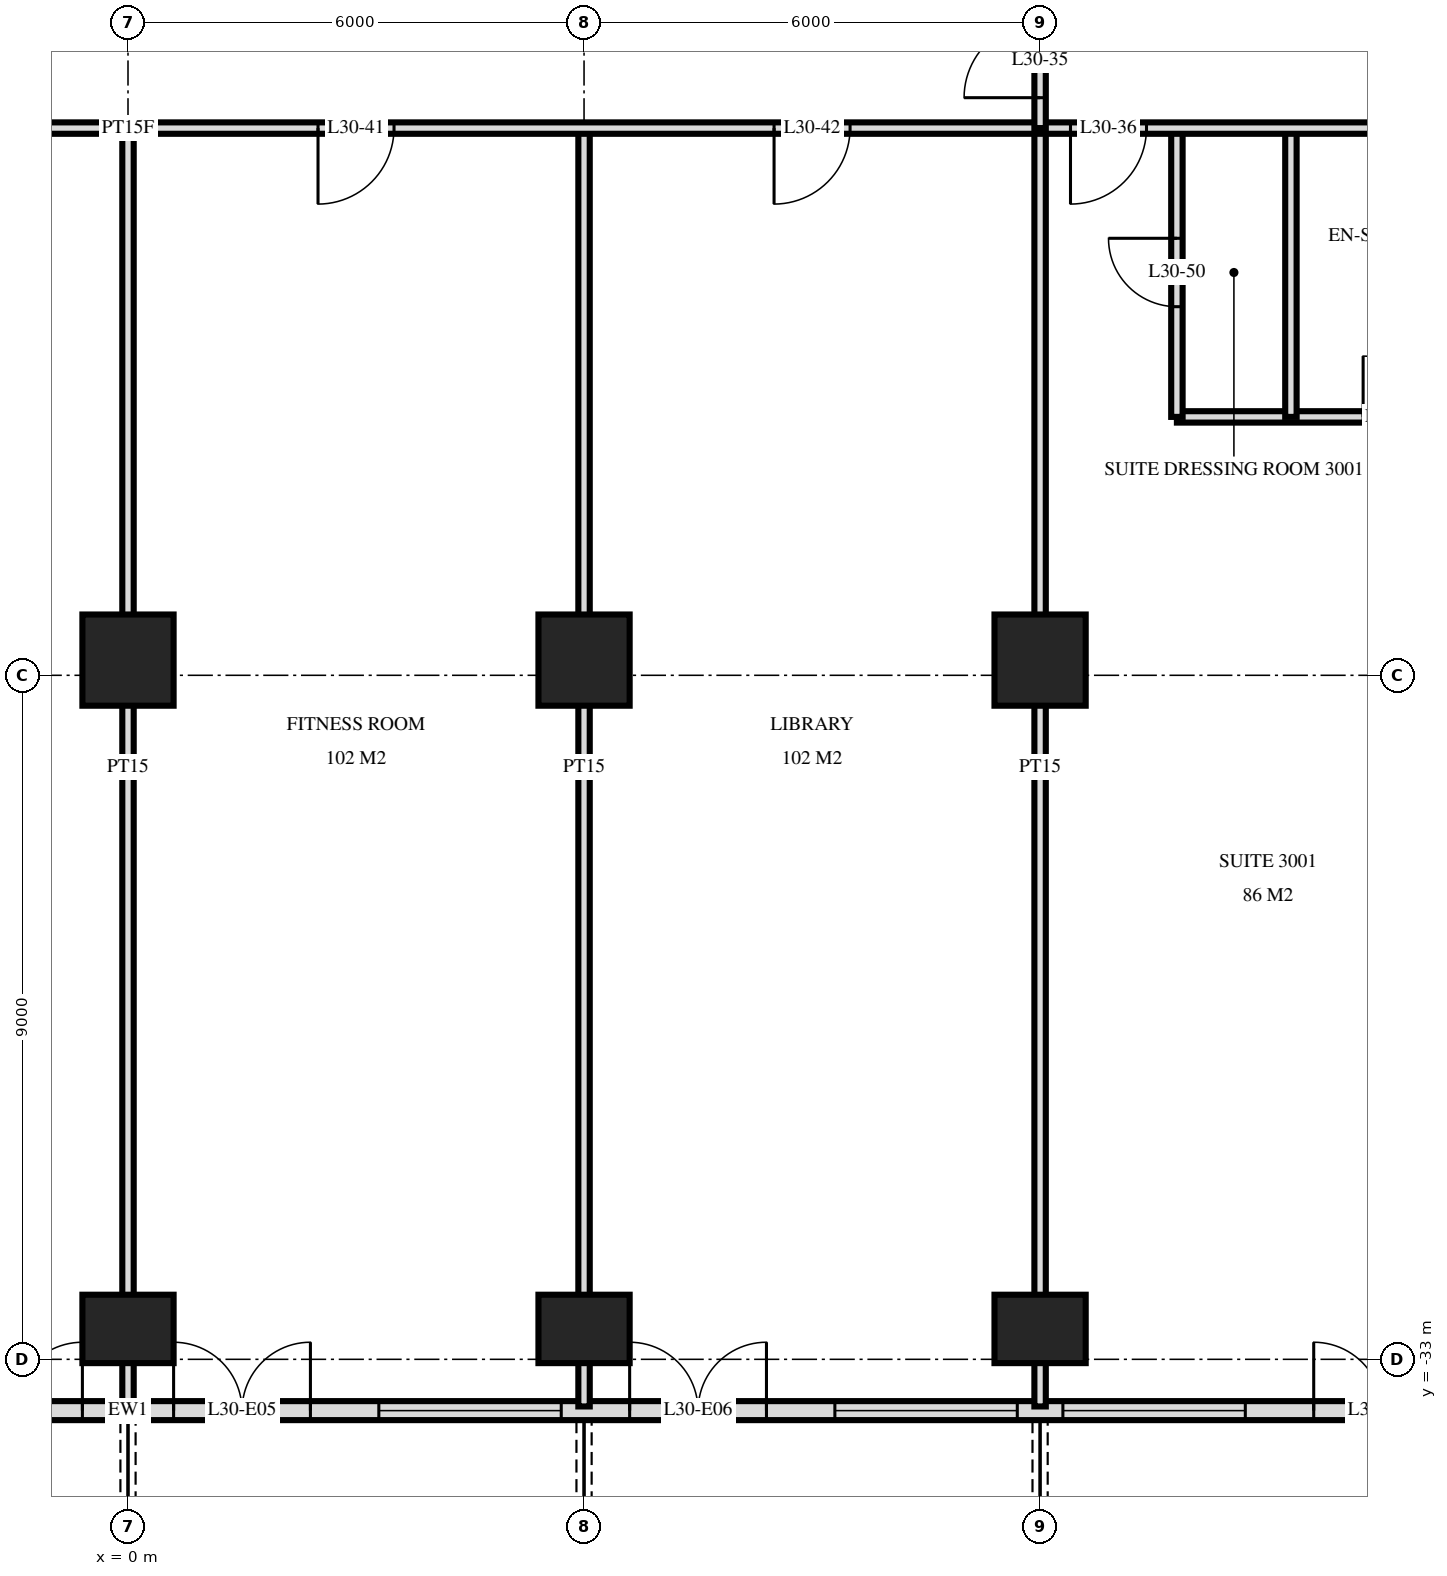
"""IFC4 building model, lengths in metres.
Left out: names, types, materials, properties, quantities, classifications, styles, units other than length and angle.
Written with IfcOpenShell. Run it as: python <this file> out.ifc"""

import sys

from ifc_helpers import new_model, si_unit, direction, frame, frame_2d, origin, origin_2d, place, context, subcontext, project, spatial, rectangle, extrude, element, fill, save


model = new_model("IFC4")
c1 = context("Model", 3, precision=1e-05, world=origin(), true_north=direction((0.0, 1.0)))
c2 = subcontext(c1, "Body", "Model", "MODEL_VIEW")
j1 = project(units=[si_unit("LENGTHUNIT", "METRE"), si_unit("PLANEANGLEUNIT", "RADIAN")], contexts=[c1])
p1 = place(None, origin())
s1 = spatial("IfcSite", under=j1, at=p1, CompositionType="ELEMENT")
p2 = place(p1, origin())
s2 = spatial("IfcBuilding", under=s1, at=p2, CompositionType="ELEMENT")
p3 = place(p2, frame((0.0, 0.0, 120.0)))
s3 = spatial("IfcBuildingStorey", under=s2, at=p3, CompositionType="ELEMENT", Elevation=120.0)
p4 = place(p3, frame((0.0, -32.6, 0.0), z_axis=(0.0, 0.0, 1.0), x_axis=(1.0, 0.0, 0.0)))
e1 = element("IfcColumn", 1, at=p4, inside=s3, PredefinedType="COLUMN", context=c2, shape_type="SweptSolid", body=[
    extrude(rectangle(XDim=1.2, YDim=0.9, at=origin_2d()), origin(), (0.0, 0.0, 1.0), 3.6),
])
p5 = place(p3, frame((0.0, -23.8, 0.0), z_axis=(0.0, 0.0, 1.0), x_axis=(1.0, 0.0, 0.0)))
e2 = element("IfcColumn", 2, at=p5, inside=s3, PredefinedType="COLUMN", context=c2, shape_type="SweptSolid", body=[
    extrude(rectangle(XDim=1.2, YDim=1.2, at=origin_2d()), origin(), (0.0, 0.0, 1.0), 3.6),
])
p6 = place(p3, frame((6.0, -32.6, 0.0), z_axis=(0.0, 0.0, 1.0), x_axis=(1.0, 0.0, 0.0)))
e3 = element("IfcColumn", 3, at=p6, inside=s3, PredefinedType="COLUMN", context=c2, shape_type="SweptSolid", body=[
    extrude(rectangle(XDim=1.2, YDim=0.9, at=origin_2d()), origin(), (0.0, 0.0, 1.0), 3.6),
])
p7 = place(p3, frame((6.0, -23.8, 0.0), z_axis=(0.0, 0.0, 1.0), x_axis=(1.0, 0.0, 0.0)))
e4 = element("IfcColumn", 4, at=p7, inside=s3, PredefinedType="COLUMN", context=c2, shape_type="SweptSolid", body=[
    extrude(rectangle(XDim=1.2, YDim=1.2, at=origin_2d()), origin(), (0.0, 0.0, 1.0), 3.6),
])
p8 = place(p3, frame((12.0, -32.6, 0.0), z_axis=(0.0, 0.0, 1.0), x_axis=(1.0, 0.0, 0.0)))
e5 = element("IfcColumn", 5, at=p8, inside=s3, PredefinedType="COLUMN", context=c2, shape_type="SweptSolid", body=[
    extrude(rectangle(XDim=1.2, YDim=0.9, at=origin_2d()), origin(), (0.0, 0.0, 1.0), 3.6),
])
p9 = place(p3, frame((12.0, -23.8, 0.0), z_axis=(0.0, 0.0, 1.0), x_axis=(1.0, 0.0, 0.0)))
e6 = element("IfcColumn", 6, at=p9, inside=s3, PredefinedType="COLUMN", context=c2, shape_type="SweptSolid", body=[
    extrude(rectangle(XDim=1.2, YDim=1.2, at=origin_2d()), origin(), (0.0, 0.0, 1.0), 3.6),
])
p10 = place(p3, frame((-23.675, -33.675, 0.0), z_axis=(0.0, 0.0, 1.0), x_axis=(1.0, 0.0, 0.0)))
e7 = element("IfcWall", 7, at=p10, inside=s3, PredefinedType="SOLIDWALL", context=c2, shape_type="SweptSolid", body=[
    extrude(rectangle(XDim=47.351, YDim=0.25, at=frame_2d((23.675, 0.0))), origin(), (0.0, 0.0, 1.0), 3.32),
])
p11 = place(p10, frame((0.275, 0.0, 0.3)))
e8 = element("IfcOpeningElement", 8, at=p11, cuts=e7, PredefinedType="OPENING", context=c2, shape_type="SweptSolid", body=[
    extrude(rectangle(XDim=2.4, YDim=2.1, at=frame_2d((1.2, 1.05))), frame((0.0, 0.135, 0.0), z_axis=(0.0, -1.0, 0.0), x_axis=(1.0, 0.0, 0.0)), (0.0, 0.0, 1.0), 0.27),
])
p12 = place(p10, frame((3.425, 0.0, 0.0)))
e9 = element("IfcOpeningElement", 9, at=p12, cuts=e7, PredefinedType="OPENING", context=c2, shape_type="SweptSolid", body=[
    extrude(rectangle(XDim=1.8, YDim=2.4, at=frame_2d((0.9, 1.2))), frame((0.0, 0.135, 0.0), z_axis=(0.0, -1.0, 0.0), x_axis=(1.0, 0.0, 0.0)), (0.0, 0.0, 1.0), 0.27),
])
p13 = place(p10, frame((7.775, 0.0, 0.0)))
e10 = element("IfcOpeningElement", 10, at=p13, cuts=e7, PredefinedType="OPENING", context=c2, shape_type="SweptSolid", body=[
    extrude(rectangle(XDim=1.8, YDim=2.4, at=frame_2d((0.9, 1.2))), frame((0.0, 0.135, 0.0), z_axis=(0.0, -1.0, 0.0), x_axis=(1.0, 0.0, 0.0)), (0.0, 0.0, 1.0), 0.27),
])
p14 = place(p10, frame((12.275, 0.0, 0.0)))
e11 = element("IfcOpeningElement", 11, at=p14, cuts=e7, PredefinedType="OPENING", context=c2, shape_type="SweptSolid", body=[
    extrude(rectangle(XDim=1.8, YDim=2.4, at=frame_2d((0.9, 1.2))), frame((0.0, 0.135, 0.0), z_axis=(0.0, -1.0, 0.0), x_axis=(1.0, 0.0, 0.0)), (0.0, 0.0, 1.0), 0.27),
])
p15 = place(p10, frame((14.975, 0.0, 0.3)))
e12 = element("IfcOpeningElement", 12, at=p15, cuts=e7, PredefinedType="OPENING", context=c2, shape_type="SweptSolid", body=[
    extrude(rectangle(XDim=2.4, YDim=2.1, at=frame_2d((1.2, 1.05))), frame((0.0, 0.135, 0.0), z_axis=(0.0, -1.0, 0.0), x_axis=(1.0, 0.0, 0.0)), (0.0, 0.0, 1.0), 0.27),
])
p16 = place(p10, frame((17.975, 0.0, 0.3)))
e13 = element("IfcOpeningElement", 13, at=p16, cuts=e7, PredefinedType="OPENING", context=c2, shape_type="SweptSolid", body=[
    extrude(rectangle(XDim=2.4, YDim=2.1, at=frame_2d((1.2, 1.05))), frame((0.0, 0.135, 0.0), z_axis=(0.0, -1.0, 0.0), x_axis=(1.0, 0.0, 0.0)), (0.0, 0.0, 1.0), 0.27),
])
p17 = place(p10, frame((21.275, 0.0, 0.0)))
e14 = element("IfcOpeningElement", 14, at=p17, cuts=e7, PredefinedType="OPENING", context=c2, shape_type="SweptSolid", body=[
    extrude(rectangle(XDim=1.8, YDim=2.4, at=frame_2d((0.9, 1.2))), frame((0.0, 0.135, 0.0), z_axis=(0.0, -1.0, 0.0), x_axis=(1.0, 0.0, 0.0)), (0.0, 0.0, 1.0), 0.27),
])
p18 = place(p10, frame((24.275, 0.0, 0.0)))
e15 = element("IfcOpeningElement", 15, at=p18, cuts=e7, PredefinedType="OPENING", context=c2, shape_type="SweptSolid", body=[
    extrude(rectangle(XDim=1.8, YDim=2.4, at=frame_2d((0.9, 1.2))), frame((0.0, 0.135, 0.0), z_axis=(0.0, -1.0, 0.0), x_axis=(1.0, 0.0, 0.0)), (0.0, 0.0, 1.0), 0.27),
])
p19 = place(p10, frame((26.975, 0.0, 0.3)))
e16 = element("IfcOpeningElement", 16, at=p19, cuts=e7, PredefinedType="OPENING", context=c2, shape_type="SweptSolid", body=[
    extrude(rectangle(XDim=2.4, YDim=2.1, at=frame_2d((1.2, 1.05))), frame((0.0, 0.135, 0.0), z_axis=(0.0, -1.0, 0.0), x_axis=(1.0, 0.0, 0.0)), (0.0, 0.0, 1.0), 0.27),
])
p20 = place(p10, frame((30.275, 0.0, 0.0)))
e17 = element("IfcOpeningElement", 17, at=p20, cuts=e7, PredefinedType="OPENING", context=c2, shape_type="SweptSolid", body=[
    extrude(rectangle(XDim=1.8, YDim=2.4, at=frame_2d((0.9, 1.2))), frame((0.0, 0.135, 0.0), z_axis=(0.0, -1.0, 0.0), x_axis=(1.0, 0.0, 0.0)), (0.0, 0.0, 1.0), 0.27),
])
p21 = place(p10, frame((32.975, 0.0, 0.3)))
e18 = element("IfcOpeningElement", 18, at=p21, cuts=e7, PredefinedType="OPENING", context=c2, shape_type="SweptSolid", body=[
    extrude(rectangle(XDim=2.4, YDim=2.1, at=frame_2d((1.2, 1.05))), frame((0.0, 0.135, 0.0), z_axis=(0.0, -1.0, 0.0), x_axis=(1.0, 0.0, 0.0)), (0.0, 0.0, 1.0), 0.27),
])
p22 = place(p10, frame((35.975, 0.0, 0.3)))
e19 = element("IfcOpeningElement", 19, at=p22, cuts=e7, PredefinedType="OPENING", context=c2, shape_type="SweptSolid", body=[
    extrude(rectangle(XDim=2.4, YDim=2.1, at=frame_2d((1.2, 1.05))), frame((0.0, 0.135, 0.0), z_axis=(0.0, -1.0, 0.0), x_axis=(1.0, 0.0, 0.0)), (0.0, 0.0, 1.0), 0.27),
])
p23 = place(p10, frame((39.275, 0.0, 0.0)))
e20 = element("IfcOpeningElement", 20, at=p23, cuts=e7, PredefinedType="OPENING", context=c2, shape_type="SweptSolid", body=[
    extrude(rectangle(XDim=1.8, YDim=2.4, at=frame_2d((0.9, 1.2))), frame((0.0, 0.135, 0.0), z_axis=(0.0, -1.0, 0.0), x_axis=(1.0, 0.0, 0.0)), (0.0, 0.0, 1.0), 0.27),
])
p24 = place(p10, frame((41.975, 0.0, 0.3)))
e21 = element("IfcOpeningElement", 21, at=p24, cuts=e7, PredefinedType="OPENING", context=c2, shape_type="SweptSolid", body=[
    extrude(rectangle(XDim=2.4, YDim=2.1, at=frame_2d((1.2, 1.05))), frame((0.0, 0.135, 0.0), z_axis=(0.0, -1.0, 0.0), x_axis=(1.0, 0.0, 0.0)), (0.0, 0.0, 1.0), 0.27),
])
p25 = place(p10, frame((45.125, 0.0, 0.0)))
e22 = element("IfcOpeningElement", 22, at=p25, cuts=e7, PredefinedType="OPENING", context=c2, shape_type="SweptSolid", body=[
    extrude(rectangle(XDim=1.8, YDim=2.4, at=frame_2d((0.9, 1.2))), frame((0.0, 0.135, 0.0), z_axis=(0.0, -1.0, 0.0), x_axis=(1.0, 0.0, 0.0)), (0.0, 0.0, 1.0), 0.27),
])
p26 = place(p3, frame((15.3, -20.6, 0.0), z_axis=(0.0, 0.0, 1.0), x_axis=(0.0, 1.0, 0.0)))
e23 = element("IfcWall", 23, at=p26, inside=s3, PredefinedType="PARTITIONING", context=c2, shape_type="SweptSolid", body=[
    extrude(rectangle(XDim=3.8, YDim=0.15, at=frame_2d((1.9, 0.0))), origin(), (0.0, 0.0, 1.0), 3.32),
])
p27 = place(p3, frame((13.8, -20.6, 0.0), z_axis=(0.0, 0.0, 1.0), x_axis=(0.0, 1.0, 0.0)))
e24 = element("IfcWall", 24, at=p27, inside=s3, PredefinedType="PARTITIONING", context=c2, shape_type="SweptSolid", body=[
    extrude(rectangle(XDim=3.8, YDim=0.15, at=frame_2d((1.9, 0.0))), origin(), (0.0, 0.0, 1.0), 3.32),
])
p28 = place(p27, frame((1.45, 0.0, 0.0)))
e25 = element("IfcOpeningElement", 25, at=p28, cuts=e24, PredefinedType="OPENING", context=c2, shape_type="SweptSolid", body=[
    extrude(rectangle(XDim=0.9, YDim=2.1, at=frame_2d((0.45, 1.05))), frame((0.0, 0.085, 0.0), z_axis=(0.0, -1.0, 0.0), x_axis=(1.0, 0.0, 0.0)), (0.0, 0.0, 1.0), 0.17),
])
p29 = place(p3, frame((12.0, -16.8, 0.0), z_axis=(0.0, 0.0, 1.0), x_axis=(0.0, 1.0, 0.0)))
e26 = element("IfcWall", 26, at=p29, inside=s3, PredefinedType="PARTITIONING", context=c2, shape_type="SweptSolid", body=[
    extrude(rectangle(XDim=1.75, YDim=0.15, at=frame_2d((0.875, 0.0))), origin(), (0.0, 0.0, 1.0), 3.32),
])
p30 = place(p29, frame((0.4, 0.0, 0.0)))
e27 = element("IfcOpeningElement", 27, at=p30, cuts=e26, PredefinedType="OPENING", context=c2, shape_type="SweptSolid", body=[
    extrude(rectangle(XDim=1.0, YDim=2.1, at=frame_2d((0.5, 1.05))), frame((0.0, 0.085, 0.0), z_axis=(0.0, -1.0, 0.0), x_axis=(1.0, 0.0, 0.0)), (0.0, 0.0, 1.0), 0.17),
])
for number, where, z_axis, x_axis in (
    (28, (12.0, -33.62, 0.0), (0.0, 0.0, 1.0), (0.0, 1.0, 0.0)),
    (29, (6.0, -33.62, 0.0), (0.0, 0.0, 1.0), (0.0, 1.0, 0.0)),
    (30, (0.0, -33.62, 0.0), (0.0, 0.0, 1.0), (0.0, 1.0, 0.0)),
):
    element("IfcWall", number, at=place(p3, frame(where, z_axis=z_axis, x_axis=x_axis)), inside=s3, PredefinedType="PARTITIONING", context=c2, shape_type="SweptSolid", body=[
        extrude(rectangle(XDim=16.82, YDim=0.15, at=frame_2d((8.41, 0.0))), origin(), (0.0, 0.0, 1.0), 3.32),
    ])
p31 = place(p3, frame((13.8, -20.6, 0.0), z_axis=(0.0, 0.0, 1.0), x_axis=(1.0, 0.0, 0.0)))
e31 = element("IfcWall", 31, at=p31, inside=s3, PredefinedType="PARTITIONING", context=c2, shape_type="SweptSolid", body=[
    extrude(rectangle(XDim=4.2, YDim=0.15, at=frame_2d((2.1, 0.0))), origin(), (0.0, 0.0, 1.0), 3.32),
])
p32 = place(p31, frame((2.45, 0.0, 0.0)))
e32 = element("IfcOpeningElement", 32, at=p32, cuts=e31, PredefinedType="OPENING", context=c2, shape_type="SweptSolid", body=[
    extrude(rectangle(XDim=0.8, YDim=2.1, at=frame_2d((0.4, 1.05))), frame((0.0, 0.085, 0.0), z_axis=(0.0, -1.0, 0.0), x_axis=(1.0, 0.0, 0.0)), (0.0, 0.0, 1.0), 0.17),
])
p33 = place(p3, frame((-28.02, -16.8, 0.0), z_axis=(0.0, 0.0, 1.0), x_axis=(1.0, 0.0, 0.0)))
e33 = element("IfcWall", 33, at=p33, inside=s3, PredefinedType="PARTITIONING", context=c2, shape_type="SweptSolid", body=[
    extrude(rectangle(XDim=56.04, YDim=0.15, at=frame_2d((28.02, 0.0))), origin(), (0.0, 0.0, 1.0), 3.32),
])
p34 = place(p33, frame((12.52, 0.0, 0.0)))
e34 = element("IfcOpeningElement", 34, at=p34, cuts=e33, PredefinedType="OPENING", context=c2, shape_type="SweptSolid", body=[
    extrude(rectangle(XDim=1.0, YDim=2.1, at=frame_2d((0.5, 1.05))), frame((0.0, 0.085, 0.0), z_axis=(0.0, -1.0, 0.0), x_axis=(1.0, 0.0, 0.0)), (0.0, 0.0, 1.0), 0.17),
])
p35 = place(p33, frame((8.32, 0.0, 0.0)))
e35 = element("IfcOpeningElement", 35, at=p35, cuts=e33, PredefinedType="OPENING", context=c2, shape_type="SweptSolid", body=[
    extrude(rectangle(XDim=1.0, YDim=2.1, at=frame_2d((0.5, 1.05))), frame((0.0, 0.085, 0.0), z_axis=(0.0, -1.0, 0.0), x_axis=(1.0, 0.0, 0.0)), (0.0, 0.0, 1.0), 0.17),
])
p36 = place(p33, frame((40.42, 0.0, 0.0)))
e36 = element("IfcOpeningElement", 36, at=p36, cuts=e33, PredefinedType="OPENING", context=c2, shape_type="SweptSolid", body=[
    extrude(rectangle(XDim=1.0, YDim=2.1, at=frame_2d((0.5, 1.05))), frame((0.0, 0.085, 0.0), z_axis=(0.0, -1.0, 0.0), x_axis=(1.0, 0.0, 0.0)), (0.0, 0.0, 1.0), 0.17),
])
p37 = place(p33, frame((46.72, 0.0, 0.0)))
e37 = element("IfcOpeningElement", 37, at=p37, cuts=e33, PredefinedType="OPENING", context=c2, shape_type="SweptSolid", body=[
    extrude(rectangle(XDim=1.0, YDim=2.1, at=frame_2d((0.5, 1.05))), frame((0.0, 0.085, 0.0), z_axis=(0.0, -1.0, 0.0), x_axis=(1.0, 0.0, 0.0)), (0.0, 0.0, 1.0), 0.17),
])
p38 = place(p33, frame((21.52, 0.0, 0.0)))
e38 = element("IfcOpeningElement", 38, at=p38, cuts=e33, PredefinedType="OPENING", context=c2, shape_type="SweptSolid", body=[
    extrude(rectangle(XDim=1.0, YDim=2.1, at=frame_2d((0.5, 1.05))), frame((0.0, 0.085, 0.0), z_axis=(0.0, -1.0, 0.0), x_axis=(1.0, 0.0, 0.0)), (0.0, 0.0, 1.0), 0.17),
])
p39 = place(p33, frame((30.52, 0.0, 0.0)))
e39 = element("IfcOpeningElement", 39, at=p39, cuts=e33, PredefinedType="OPENING", context=c2, shape_type="SweptSolid", body=[
    extrude(rectangle(XDim=1.0, YDim=2.1, at=frame_2d((0.5, 1.05))), frame((0.0, 0.085, 0.0), z_axis=(0.0, -1.0, 0.0), x_axis=(1.0, 0.0, 0.0)), (0.0, 0.0, 1.0), 0.17),
])
p40 = place(p33, frame((36.52, 0.0, 0.0)))
e40 = element("IfcOpeningElement", 40, at=p40, cuts=e33, PredefinedType="OPENING", context=c2, shape_type="SweptSolid", body=[
    extrude(rectangle(XDim=1.0, YDim=2.1, at=frame_2d((0.5, 1.05))), frame((0.0, 0.085, 0.0), z_axis=(0.0, -1.0, 0.0), x_axis=(1.0, 0.0, 0.0)), (0.0, 0.0, 1.0), 0.17),
])
p41 = place(p17, origin())
e41 = element("IfcDoor", 41, at=p41, inside=s3, OperationType="DOUBLE_DOOR_SINGLE_SWING", PredefinedType="DOOR", context=c2, shape_type="SweptSolid", body=[
    extrude(rectangle(XDim=1.8, YDim=2.4, at=frame_2d((0.9, 1.2))), frame((0.0, 0.025, 0.0), z_axis=(0.0, -1.0, 0.0), x_axis=(1.0, 0.0, 0.0)), (0.0, 0.0, 1.0), 0.05),
])
fill(e14, e41)
p42 = place(p18, origin())
e42 = element("IfcDoor", 42, at=p42, inside=s3, OperationType="DOUBLE_DOOR_SINGLE_SWING", PredefinedType="DOOR", context=c2, shape_type="SweptSolid", body=[
    extrude(rectangle(XDim=1.8, YDim=2.4, at=frame_2d((0.9, 1.2))), frame((0.0, 0.025, 0.0), z_axis=(0.0, -1.0, 0.0), x_axis=(1.0, 0.0, 0.0)), (0.0, 0.0, 1.0), 0.05),
])
fill(e15, e42)
p43 = place(p19, origin())
e43 = element("IfcWindow", 43, at=p43, inside=s3, PartitioningType="SINGLE_PANEL", PredefinedType="WINDOW", context=c2, shape_type="SweptSolid", body=[
    extrude(rectangle(XDim=2.4, YDim=2.1, at=frame_2d((1.2, 1.05))), frame((0.0, 0.03, 0.0), z_axis=(0.0, -1.0, 0.0), x_axis=(1.0, 0.0, 0.0)), (0.0, 0.0, 1.0), 0.06),
])
fill(e16, e43)
p44 = place(p20, origin())
e44 = element("IfcDoor", 44, at=p44, inside=s3, OperationType="DOUBLE_DOOR_SINGLE_SWING", PredefinedType="DOOR", context=c2, shape_type="SweptSolid", body=[
    extrude(rectangle(XDim=1.8, YDim=2.4, at=frame_2d((0.9, 1.2))), frame((0.0, 0.025, 0.0), z_axis=(0.0, -1.0, 0.0), x_axis=(1.0, 0.0, 0.0)), (0.0, 0.0, 1.0), 0.05),
])
fill(e17, e44)
p45 = place(p21, origin())
e45 = element("IfcWindow", 45, at=p45, inside=s3, PartitioningType="SINGLE_PANEL", PredefinedType="WINDOW", context=c2, shape_type="SweptSolid", body=[
    extrude(rectangle(XDim=2.4, YDim=2.1, at=frame_2d((1.2, 1.05))), frame((0.0, 0.03, 0.0), z_axis=(0.0, -1.0, 0.0), x_axis=(1.0, 0.0, 0.0)), (0.0, 0.0, 1.0), 0.06),
])
fill(e18, e45)
p46 = place(p22, origin())
e46 = element("IfcWindow", 46, at=p46, inside=s3, PartitioningType="SINGLE_PANEL", PredefinedType="WINDOW", context=c2, shape_type="SweptSolid", body=[
    extrude(rectangle(XDim=2.4, YDim=2.1, at=frame_2d((1.2, 1.05))), frame((0.0, 0.03, 0.0), z_axis=(0.0, -1.0, 0.0), x_axis=(1.0, 0.0, 0.0)), (0.0, 0.0, 1.0), 0.06),
])
fill(e19, e46)
p47 = place(p23, origin())
e47 = element("IfcDoor", 47, at=p47, inside=s3, OperationType="DOUBLE_DOOR_SINGLE_SWING", PredefinedType="DOOR", context=c2, shape_type="SweptSolid", body=[
    extrude(rectangle(XDim=1.8, YDim=2.4, at=frame_2d((0.9, 1.2))), frame((0.0, 0.025, 0.0), z_axis=(0.0, -1.0, 0.0), x_axis=(1.0, 0.0, 0.0)), (0.0, 0.0, 1.0), 0.05),
])
fill(e20, e47)
p48 = place(p30, origin())
e48 = element("IfcDoor", 48, at=p48, inside=s3, OperationType="SINGLE_SWING_RIGHT", PredefinedType="DOOR", context=c2, shape_type="SweptSolid", body=[
    extrude(rectangle(XDim=1.0, YDim=2.1, at=frame_2d((0.5, 1.05))), frame((0.0, 0.025, 0.0), z_axis=(0.0, -1.0, 0.0), x_axis=(1.0, 0.0, 0.0)), (0.0, 0.0, 1.0), 0.05),
])
fill(e27, e48)
p49 = place(p36, frame((0.5, 0.0, 0.0), z_axis=(0.0, 0.0, 1.0), x_axis=(-1.0, 0.0, 0.0)))
e49 = element("IfcDoor", 49, at=p49, inside=s3, OperationType="SINGLE_SWING_LEFT", PredefinedType="DOOR", context=c2, shape_type="SweptSolid", body=[
    extrude(rectangle(XDim=1.0, YDim=2.1, at=frame_2d((0.0, 1.05))), frame((0.0, -0.025, 0.0), z_axis=(0.0, 1.0, 0.0), x_axis=(-1.0, 0.0, 0.0)), (0.0, 0.0, 1.0), 0.05),
])
fill(e36, e49)
p50 = place(p39, frame((0.5, 0.0, 0.0), z_axis=(0.0, 0.0, 1.0), x_axis=(-1.0, 0.0, 0.0)))
e50 = element("IfcDoor", 50, at=p50, inside=s3, OperationType="SINGLE_SWING_LEFT", PredefinedType="DOOR", context=c2, shape_type="SweptSolid", body=[
    extrude(rectangle(XDim=1.0, YDim=2.1, at=frame_2d((0.0, 1.05))), frame((0.0, -0.025, 0.0), z_axis=(0.0, 1.0, 0.0), x_axis=(-1.0, 0.0, 0.0)), (0.0, 0.0, 1.0), 0.05),
])
fill(e39, e50)
p51 = place(p40, frame((0.5, 0.0, 0.0), z_axis=(0.0, 0.0, 1.0), x_axis=(-1.0, 0.0, 0.0)))
e51 = element("IfcDoor", 51, at=p51, inside=s3, OperationType="SINGLE_SWING_LEFT", PredefinedType="DOOR", context=c2, shape_type="SweptSolid", body=[
    extrude(rectangle(XDim=1.0, YDim=2.1, at=frame_2d((0.0, 1.05))), frame((0.0, -0.025, 0.0), z_axis=(0.0, 1.0, 0.0), x_axis=(-1.0, 0.0, 0.0)), (0.0, 0.0, 1.0), 0.05),
])
fill(e40, e51)
p52 = place(p28, origin())
e52 = element("IfcDoor", 52, at=p52, inside=s3, OperationType="SINGLE_SWING_LEFT", PredefinedType="DOOR", context=c2, shape_type="SweptSolid", body=[
    extrude(rectangle(XDim=0.9, YDim=2.1, at=frame_2d((0.45, 1.05))), frame((0.0, 0.025, 0.0), z_axis=(0.0, -1.0, 0.0), x_axis=(1.0, 0.0, 0.0)), (0.0, 0.0, 1.0), 0.05),
])
fill(e25, e52)
p53 = place(p32, origin())
e53 = element("IfcDoor", 53, at=p53, inside=s3, OperationType="SINGLE_SWING_RIGHT", PredefinedType="DOOR", context=c2, shape_type="SweptSolid", body=[
    extrude(rectangle(XDim=0.8, YDim=2.1, at=frame_2d((0.4, 1.05))), frame((0.0, 0.025, 0.0), z_axis=(0.0, -1.0, 0.0), x_axis=(1.0, 0.0, 0.0)), (0.0, 0.0, 1.0), 0.05),
])
fill(e32, e53)
save(model, sys.argv[1])
